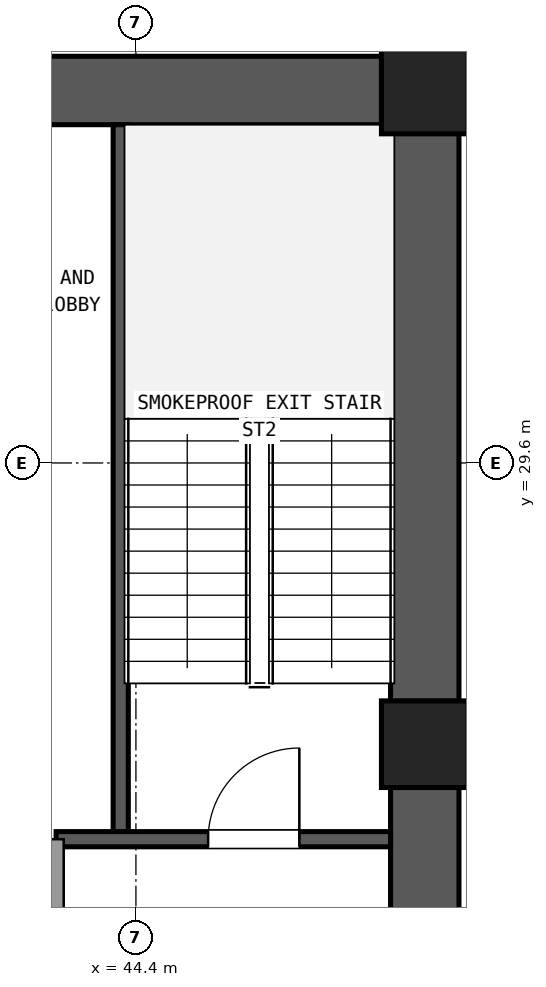
"""IFC4 building model, lengths in metres.
Left out: names, types, materials, properties, quantities, classifications, styles, units other than length and angle.
Written with IfcOpenShell. Run it as: python <this file> out.ifc"""

import sys

from ifc_helpers import new_model, si_unit, direction, frame, frame_2d, origin, origin_2d, place, context, subcontext, project, spatial, rectangle, extrude, element, fill, save


model = new_model("IFC4")
c1 = context("Model", 3, precision=1e-05, world=origin(), true_north=direction((0.0, 1.0)))
c2 = subcontext(c1, "Body", "Model", "MODEL_VIEW")
j1 = project(units=[si_unit("LENGTHUNIT", "METRE"), si_unit("PLANEANGLEUNIT", "RADIAN")], contexts=[c1])
p1 = place(None, origin())
s1 = spatial("IfcSite", under=j1, at=p1, CompositionType="ELEMENT")
p2 = place(p1, origin())
s2 = spatial("IfcBuilding", under=s1, at=p2, CompositionType="ELEMENT")
p3 = place(p2, frame((0.0, 0.0, -4.86)))
s3 = spatial("IfcBuildingStorey", under=s2, at=p3, CompositionType="ELEMENT", Elevation=-4.86)
for number, where, z_axis, x_axis in (
    (1, (48.2, 25.9, 0.0), (0.0, 0.0, 1.0), (1.0, 0.0, 0.0)),
    (2, (48.2, 34.5, 0.0), (0.0, 0.0, 1.0), (1.0, 0.0, 0.0)),
):
    element("IfcColumn", number, at=place(p3, frame(where, z_axis=z_axis, x_axis=x_axis)), inside=s3, PredefinedType="COLUMN", context=c2, shape_type="SweptSolid", body=[
        extrude(rectangle(XDim=1.14, YDim=1.14, at=origin_2d()), origin(), (0.0, 0.0, 1.0), 4.86),
    ])
for number, where, z_axis, x_axis in (
    (3, (48.2, 17.865, 0.0), (0.0, 0.0, 1.0), (0.0, 1.0, 0.0)),
    (4, (48.2, 26.465, 0.0), (0.0, 0.0, 1.0), (0.0, 1.0, 0.0)),
):
    element("IfcWall", number, at=place(p3, frame(where, z_axis=z_axis, x_axis=x_axis)), inside=s3, PredefinedType="SHEAR", context=c2, shape_type="SweptSolid", body=[
        extrude(rectangle(XDim=7.47, YDim=0.9, at=frame_2d((3.735, 0.0))), origin(), (0.0, 0.0, 1.0), 4.56),
    ])
p4 = place(p3, frame((47.635, 34.5, 0.0), z_axis=(0.0, 0.0, 1.0), x_axis=(-1.0, 0.0, 0.0)))
e5 = element("IfcWall", 5, at=p4, inside=s3, PredefinedType="SHEAR", context=c2, shape_type="SweptSolid", body=[
    extrude(rectangle(XDim=10.07, YDim=0.9, at=frame_2d((5.035, 0.0))), origin(), (0.0, 0.0, 1.0), 4.56),
])
p5 = place(p3, frame((44.2, 24.65, 0.0), z_axis=(0.0, 0.0, 1.0), x_axis=(0.0, 1.0, 0.0)))
e6 = element("IfcWall", 6, at=p5, inside=s3, PredefinedType="SHEAR", context=c2, shape_type="SweptSolid", body=[
    extrude(rectangle(XDim=9.4, YDim=0.2, at=frame_2d((4.7, 0.0))), origin(), (0.0, 0.0, 1.0), 4.56),
])
p6 = place(p3, frame((43.35, 24.65, 0.0), z_axis=(0.0, 0.0, 1.0), x_axis=(1.0, 0.0, 0.0)))
e7 = element("IfcWall", 7, at=p6, inside=s3, PredefinedType="SHEAR", context=c2, shape_type="SweptSolid", body=[
    extrude(rectangle(XDim=4.4, YDim=0.2, at=frame_2d((2.2, 0.0))), origin(), (0.0, 0.0, 1.0), 4.56),
])
p7 = place(p6, frame((2.0, 0.0, 0.0)))
e8 = element("IfcOpeningElement", 8, at=p7, cuts=e7, PredefinedType="OPENING", context=c2, shape_type="SweptSolid", body=[
    extrude(rectangle(XDim=1.2, YDim=2.15, at=frame_2d((0.6, 1.075))), frame((0.0, 0.11, 0.0), z_axis=(0.0, -1.0, 0.0), x_axis=(1.0, 0.0, 0.0)), (0.0, 0.0, 1.0), 0.22),
])
p8 = place(p3, frame((43.35, 17.75, 0.0), z_axis=(0.0, 0.0, 1.0), x_axis=(0.0, 1.0, 0.0)))
e9 = element("IfcWall", 9, at=p8, inside=s3, PredefinedType="SOLIDWALL", context=c2, shape_type="SweptSolid", body=[
    extrude(rectangle(XDim=6.9, YDim=0.2, at=frame_2d((3.45, 0.0))), origin(), (0.0, 0.0, 1.0), 3.85),
])
p9 = place(p8, frame((4.15, 0.0, 0.0)))
e10 = element("IfcOpeningElement", 10, at=p9, cuts=e9, PredefinedType="OPENING", context=c2, shape_type="SweptSolid", body=[
    extrude(rectangle(XDim=1.2, YDim=2.15, at=frame_2d((0.6, 1.075))), frame((0.0, 0.11, 0.0), z_axis=(0.0, -1.0, 0.0), x_axis=(1.0, 0.0, 0.0)), (0.0, 0.0, 1.0), 0.22),
])
p10 = place(p7, origin())
e11 = element("IfcDoor", 11, at=p10, inside=s3, OperationType="SINGLE_SWING_RIGHT", PredefinedType="DOOR", context=c2, shape_type="SweptSolid", body=[
    extrude(rectangle(XDim=1.2, YDim=2.15, at=frame_2d((0.6, 1.075))), frame((0.0, 0.025, 0.0), z_axis=(0.0, -1.0, 0.0), x_axis=(1.0, 0.0, 0.0)), (0.0, 0.0, 1.0), 0.05),
])
fill(e8, e11)
save(model, sys.argv[1])
